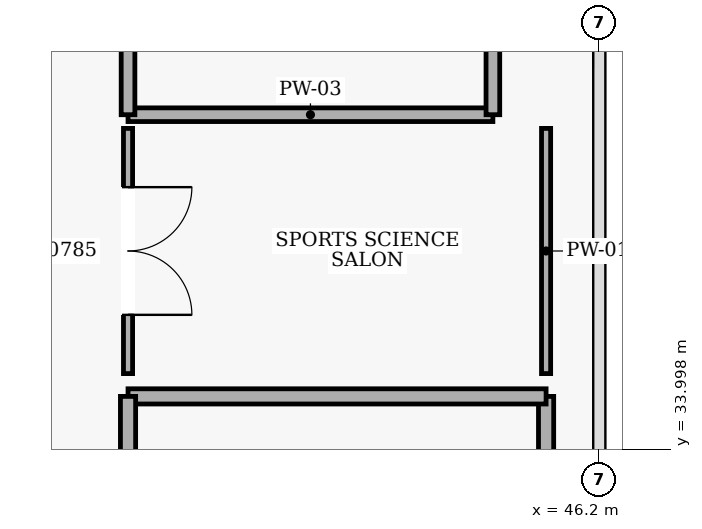
"""IFC4 building model, lengths in metres.
Left out: names, types, materials, properties, quantities, classifications, styles, units other than length and angle.
Written with IfcOpenShell. Run it as: python <this file> out.ifc"""

import sys

from ifc_helpers import new_model, si_unit, direction, frame, frame_2d, origin, place, context, subcontext, project, spatial, rectangle, extrude, element, fill, save


model = new_model("IFC4")
c1 = context("Model", 3, precision=1e-05, world=origin(), true_north=direction((0.0, 1.0)))
c2 = subcontext(c1, "Body", "Model", "MODEL_VIEW")
j1 = project(units=[si_unit("LENGTHUNIT", "METRE"), si_unit("PLANEANGLEUNIT", "RADIAN")], contexts=[c1])
p1 = place(None, origin())
s1 = spatial("IfcSite", under=j1, at=p1, CompositionType="ELEMENT")
p2 = place(p1, origin())
s2 = spatial("IfcBuilding", under=s1, at=p2, CompositionType="ELEMENT")
p3 = place(p2, frame((0.0, 0.0, 24.6)))
s3 = spatial("IfcBuildingStorey", under=s2, at=p3, CompositionType="ELEMENT", Elevation=24.6)
p4 = place(p3, frame((40.0, 38.4, 0.0), z_axis=(0.0, 0.0, 1.0), x_axis=(1.0, 0.0, 0.0)))
e1 = element("IfcWall", 1, at=p4, inside=s3, PredefinedType="PARTITIONING", context=c2, shape_type="SweptSolid", body=[
    extrude(rectangle(XDim=4.8, YDim=0.18, at=frame_2d((2.4, 0.0))), origin(), (0.0, 0.0, 1.0), 4.5),
])
p5 = place(p3, frame((44.8, 38.4, 0.0), z_axis=(0.0, 0.0, 1.0), x_axis=(0.0, 1.0, 0.0)))
e2 = element("IfcWall", 2, at=p5, inside=s3, PredefinedType="PARTITIONING", context=c2, shape_type="SweptSolid", body=[
    extrude(rectangle(XDim=3.2, YDim=0.18, at=frame_2d((1.6, 0.0))), origin(), (0.0, 0.0, 1.0), 4.5),
])
p6 = place(p3, frame((40.0, 41.6, 0.0), z_axis=(0.0, 0.0, 1.0), x_axis=(0.0, -1.0, 0.0)))
e3 = element("IfcWall", 3, at=p6, inside=s3, PredefinedType="PARTITIONING", context=c2, shape_type="SweptSolid", body=[
    extrude(rectangle(XDim=3.2, YDim=0.18, at=frame_2d((1.6, 0.0))), origin(), (0.0, 0.0, 1.0), 4.5),
])
p7 = place(p6, frame((1.14, 0.0, 0.0)))
e4 = element("IfcOpeningElement", 4, at=p7, cuts=e3, PredefinedType="OPENING", context=c2, shape_type="SweptSolid", body=[
    extrude(rectangle(XDim=0.92, YDim=2.1, at=frame_2d((0.46, 1.05))), frame((0.0, 0.1, 0.0), z_axis=(0.0, -1.0, 0.0), x_axis=(1.0, 0.0, 0.0)), (0.0, 0.0, 1.0), 0.2),
])
p8 = place(p3, frame((45.5, 25.895, 0.0), z_axis=(0.0, 0.0, 1.0), x_axis=(0.0, 1.0, 0.0)))
e5 = element("IfcWall", 5, at=p8, inside=s3, PredefinedType="PARTITIONING", context=c2, shape_type="SweptSolid", body=[
    extrude(rectangle(XDim=8.799, YDim=0.2, at=frame_2d((4.399, 0.0))), origin(), (0.0, 0.0, 1.0), 4.5),
])
p9 = place(p3, frame((45.5, 34.694, 0.0), z_axis=(0.0, 0.0, 1.0), x_axis=(-1.0, 0.0, 0.0)))
e6 = element("IfcWall", 6, at=p9, inside=s3, PredefinedType="PARTITIONING", context=c2, shape_type="SweptSolid", body=[
    extrude(rectangle(XDim=5.5, YDim=0.2, at=frame_2d((2.75, 0.0))), origin(), (0.0, 0.0, 1.0), 4.5),
])
p10 = place(p3, frame((40.0, 34.694, 0.0), z_axis=(0.0, 0.0, 1.0), x_axis=(0.0, -1.0, 0.0)))
e7 = element("IfcWall", 7, at=p10, inside=s3, PredefinedType="PARTITIONING", context=c2, shape_type="SweptSolid", body=[
    extrude(rectangle(XDim=8.799, YDim=0.2, at=frame_2d((4.399, 0.0))), origin(), (0.0, 0.0, 1.0), 4.5),
])
p11 = place(p10, frame((3.625, 0.0, 0.0)))
e8 = element("IfcOpeningElement", 8, at=p11, cuts=e7, PredefinedType="OPENING", context=c2, shape_type="SweptSolid", body=[
    extrude(rectangle(XDim=1.55, YDim=2.2, at=frame_2d((0.775, 1.1))), frame((0.0, 0.11, 0.0), z_axis=(0.0, -1.0, 0.0), x_axis=(1.0, 0.0, 0.0)), (0.0, 0.0, 1.0), 0.22),
])
p12 = place(p3, frame((45.5, 34.994, 0.0), z_axis=(0.0, 0.0, 1.0), x_axis=(0.0, 1.0, 0.0)))
e9 = element("IfcWall", 9, at=p12, inside=s3, PredefinedType="PARTITIONING", context=c2, shape_type="SweptSolid", body=[
    extrude(rectangle(XDim=3.226, YDim=0.12, at=frame_2d((1.613, 0.0))), origin(), (0.0, 0.0, 1.0), 4.5),
])
p13 = place(p3, frame((40.0, 38.22, 0.0), z_axis=(0.0, 0.0, 1.0), x_axis=(0.0, -1.0, 0.0)))
e10 = element("IfcWall", 10, at=p13, inside=s3, PredefinedType="PARTITIONING", context=c2, shape_type="SweptSolid", body=[
    extrude(rectangle(XDim=3.226, YDim=0.12, at=frame_2d((1.613, 0.0))), origin(), (0.0, 0.0, 1.0), 4.5),
])
p14 = place(p13, frame((0.773, 0.0, 0.0)))
e11 = element("IfcOpeningElement", 11, at=p14, cuts=e10, PredefinedType="OPENING", context=c2, shape_type="SweptSolid", body=[
    extrude(rectangle(XDim=1.68, YDim=2.25, at=frame_2d((0.84, 1.125))), frame((0.0, 0.07, 0.0), z_axis=(0.0, -1.0, 0.0), x_axis=(1.0, 0.0, 0.0)), (0.0, 0.0, 1.0), 0.14),
])
p15 = place(p14, origin())
e12 = element("IfcDoor", 12, at=p15, inside=s3, OperationType="DOUBLE_DOOR_SINGLE_SWING", PredefinedType="DOOR", context=c2, shape_type="SweptSolid", body=[
    extrude(rectangle(XDim=1.68, YDim=2.25, at=frame_2d((0.84, 1.125))), frame((0.0, 0.025, 0.0), z_axis=(0.0, -1.0, 0.0), x_axis=(1.0, 0.0, 0.0)), (0.0, 0.0, 1.0), 0.05),
])
fill(e11, e12)
save(model, sys.argv[1])
